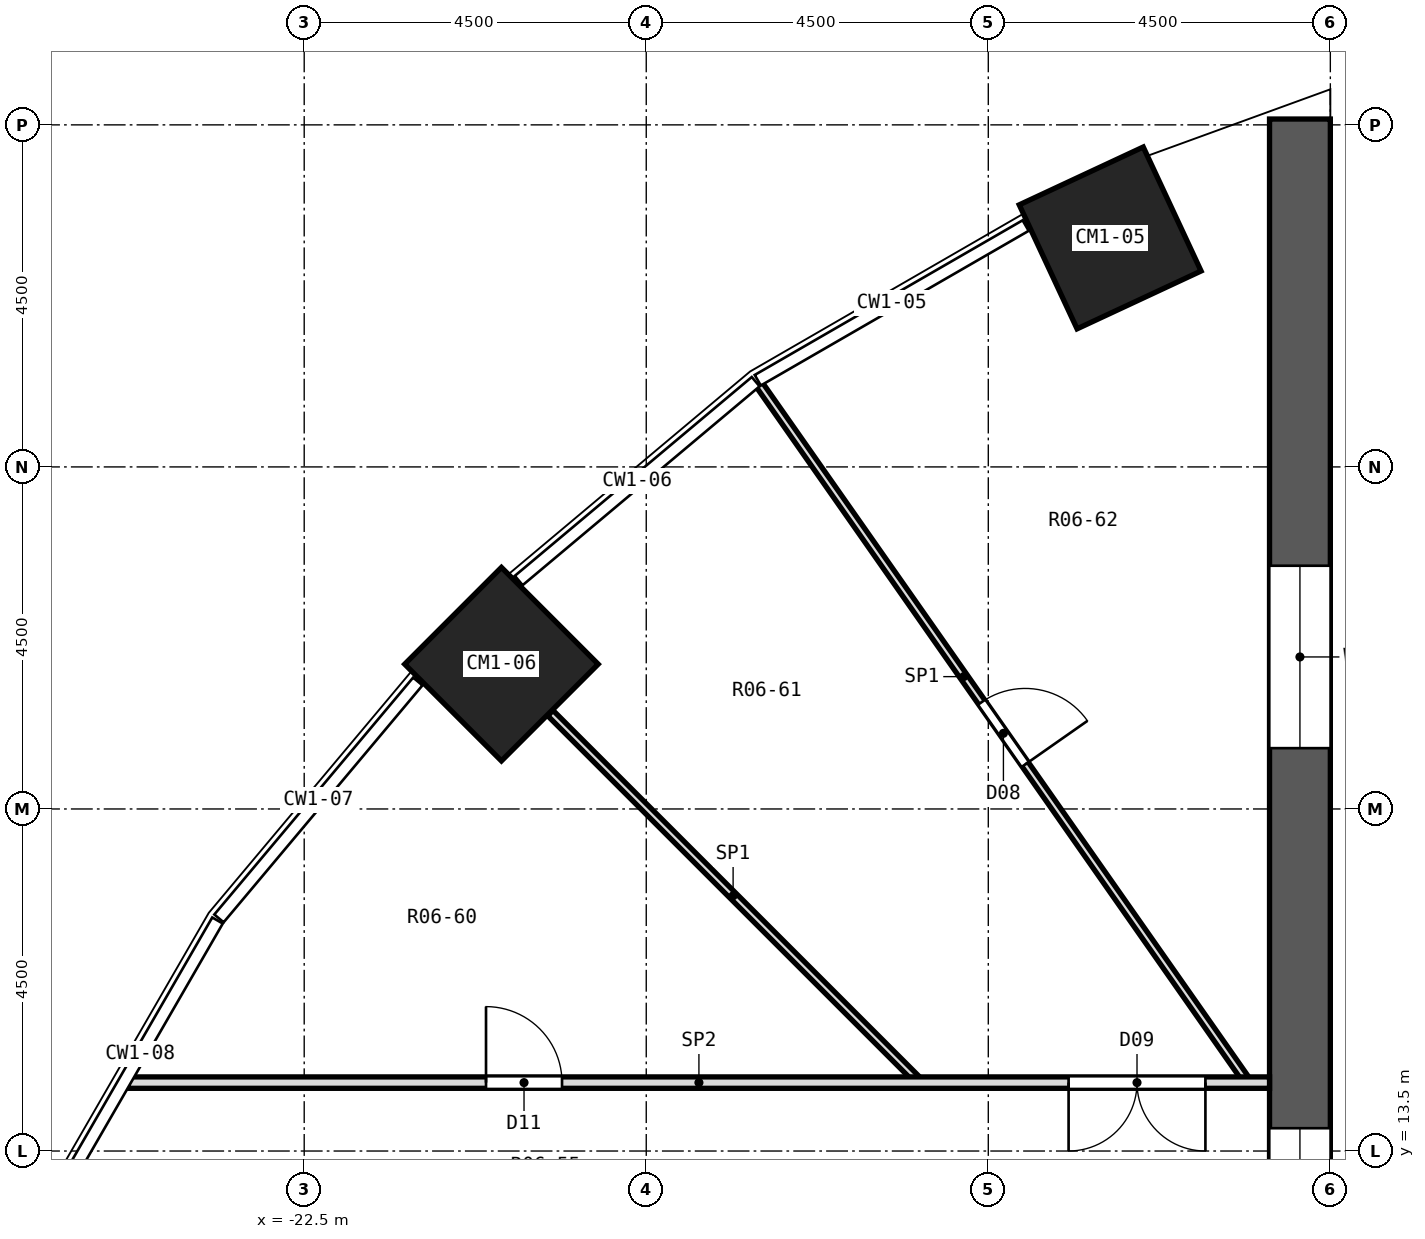
"""IFC4 building model, lengths in metres.
Left out: names, types, materials, properties, quantities, classifications, styles, units other than length and angle.
Written with IfcOpenShell. Run it as: python <this file> out.ifc"""

import sys

from ifc_helpers import new_model, si_unit, direction, frame, frame_2d, origin, origin_2d, place, context, subcontext, project, spatial, polyline, rectangle, outline, extrude, element, fill, save


model = new_model("IFC4")
c1 = context("Model", 3, precision=1e-05, world=origin(), true_north=direction((0.0, 1.0)))
c2 = subcontext(c1, "Body", "Model", "MODEL_VIEW")
j1 = project(units=[si_unit("LENGTHUNIT", "METRE"), si_unit("PLANEANGLEUNIT", "RADIAN")], contexts=[c1])
p1 = place(None, origin())
s1 = spatial("IfcSite", under=j1, at=p1, CompositionType="ELEMENT")
p2 = place(p1, origin())
s2 = spatial("IfcBuilding", under=s1, at=p2, CompositionType="ELEMENT")
p3 = place(p2, frame((0.0, 0.0, 13.4)))
s3 = spatial("IfcBuildingStorey", under=s2, at=p3, CompositionType="ELEMENT", Elevation=13.4)
for number, where, z_axis, x_axis in (
    (1, (-11.897, 25.512, 0.0), (0.0, 0.0, 1.0), (-0.423, 0.906, 0.0)),
    (2, (-19.905, 19.905, 0.0), (0.0, 0.0, 1.0), (-0.707, 0.707, 0.0)),
):
    element("IfcColumn", number, at=place(p3, frame(where, z_axis=z_axis, x_axis=x_axis)), inside=s3, PredefinedType="COLUMN", context=c2, shape_type="SweptSolid", body=[
        extrude(rectangle(XDim=1.8, YDim=1.8, at=origin_2d()), origin(), (0.0, 0.0, 1.0), 4.2),
    ])
p4 = place(p3, frame((-9.4, -27.077, 0.0), z_axis=(0.0, 0.0, 1.0), x_axis=(0.0, 1.0, 0.0)))
e3 = element("IfcWall", 3, at=p4, inside=s3, PredefinedType="SHEAR", context=c2, shape_type="SweptSolid", body=[
    extrude(rectangle(XDim=54.154, YDim=0.8, at=frame_2d((27.077, 0.0))), origin(), (0.0, 0.0, 1.0), 4.2),
])
p5 = place(p4, frame((13.277, 0.0, 0.9)))
e4 = element("IfcOpeningElement", 4, at=p5, cuts=e3, PredefinedType="OPENING", context=c2, shape_type="SweptSolid", body=[
    extrude(rectangle(XDim=2.4, YDim=2.1, at=frame_2d((1.2, 1.05))), frame((0.0, 0.412, 0.0), z_axis=(0.0, -1.0, 0.0), x_axis=(1.0, 0.0, 0.0)), (0.0, 0.0, 1.0), 0.824),
])
p6 = place(p4, frame((17.877, 0.0, 0.9)))
e5 = element("IfcOpeningElement", 5, at=p6, cuts=e3, PredefinedType="OPENING", context=c2, shape_type="SweptSolid", body=[
    extrude(rectangle(XDim=2.4, YDim=2.1, at=frame_2d((1.2, 1.05))), frame((0.0, 0.412, 0.0), z_axis=(0.0, -1.0, 0.0), x_axis=(1.0, 0.0, 0.0)), (0.0, 0.0, 1.0), 0.824),
])
p7 = place(p4, frame((22.477, 0.0, 0.9)))
e6 = element("IfcOpeningElement", 6, at=p7, cuts=e3, PredefinedType="OPENING", context=c2, shape_type="SweptSolid", body=[
    extrude(rectangle(XDim=2.4, YDim=2.1, at=frame_2d((1.2, 1.05))), frame((0.0, 0.412, 0.0), z_axis=(0.0, -1.0, 0.0), x_axis=(1.0, 0.0, 0.0)), (0.0, 0.0, 1.0), 0.824),
])
p8 = place(p4, frame((29.277, 0.0, 0.9)))
e7 = element("IfcOpeningElement", 7, at=p8, cuts=e3, PredefinedType="OPENING", context=c2, shape_type="SweptSolid", body=[
    extrude(rectangle(XDim=2.4, YDim=2.1, at=frame_2d((1.2, 1.05))), frame((0.0, 0.412, 0.0), z_axis=(0.0, -1.0, 0.0), x_axis=(1.0, 0.0, 0.0)), (0.0, 0.0, 1.0), 0.824),
])
p9 = place(p4, frame((33.877, 0.0, 0.9)))
e8 = element("IfcOpeningElement", 8, at=p9, cuts=e3, PredefinedType="OPENING", context=c2, shape_type="SweptSolid", body=[
    extrude(rectangle(XDim=2.4, YDim=2.1, at=frame_2d((1.2, 1.05))), frame((0.0, 0.412, 0.0), z_axis=(0.0, -1.0, 0.0), x_axis=(1.0, 0.0, 0.0)), (0.0, 0.0, 1.0), 0.824),
])
p10 = place(p4, frame((38.477, 0.0, 0.9)))
e9 = element("IfcOpeningElement", 9, at=p10, cuts=e3, PredefinedType="OPENING", context=c2, shape_type="SweptSolid", body=[
    extrude(rectangle(XDim=2.4, YDim=2.1, at=frame_2d((1.2, 1.05))), frame((0.0, 0.412, 0.0), z_axis=(0.0, -1.0, 0.0), x_axis=(1.0, 0.0, 0.0)), (0.0, 0.0, 1.0), 0.824),
])
p11 = place(p4, frame((5.877, 0.0, 0.9)))
e10 = element("IfcOpeningElement", 10, at=p11, cuts=e3, PredefinedType="OPENING", context=c2, shape_type="SweptSolid", body=[
    extrude(rectangle(XDim=2.4, YDim=2.1, at=frame_2d((1.2, 1.05))), frame((0.0, 0.412, 0.0), z_axis=(0.0, -1.0, 0.0), x_axis=(1.0, 0.0, 0.0)), (0.0, 0.0, 1.0), 0.824),
])
p12 = place(p4, frame((45.877, 0.0, 0.9)))
e11 = element("IfcOpeningElement", 11, at=p12, cuts=e3, PredefinedType="OPENING", context=c2, shape_type="SweptSolid", body=[
    extrude(rectangle(XDim=2.4, YDim=2.1, at=frame_2d((1.2, 1.05))), frame((0.0, 0.412, 0.0), z_axis=(0.0, -1.0, 0.0), x_axis=(1.0, 0.0, 0.0)), (0.0, 0.0, 1.0), 0.824),
])
p13 = place(p3, frame((-11.631, 26.482, 0.0), z_axis=(-0.342026905008, 0.939688050207, 0.001991117406), x_axis=(0.93968991291, 0.342027583063, -3.2668e-08)))
e12 = element("IfcWall", 12, at=p13, inside=s3, PredefinedType="SOLIDWALL", context=c2, shape_type="SweptSolid", body=[
    extrude(outline(polyline([(0.0, 0.0), (2.81, 2.168e-19), (3.467, -8.514e-08), (3.745, -0.523), (3.745, -3.65), (3.745, -4.2), (2.81, -4.2), (2.81, -3.65), (-4.403e-05, -3.65), (0.0, 0.0)])), origin(), (0.0, 0.0, -1.0), 0.38),
])
p14 = place(p3, frame((-16.519, 23.591, 0.0), z_axis=(0.0, 0.0, 1.0), x_axis=(0.573601998214, -0.819134145086, 0.0)))
e13 = element("IfcWall", 13, at=p14, inside=s3, PredefinedType="PARTITIONING", context=c2, shape_type="SweptSolid", body=[
    extrude(rectangle(XDim=11.146, YDim=0.1, at=frame_2d((5.573, 0.0))), origin(), (0.0, 0.0, 1.0), 3.65),
])
p15 = place(p14, frame((5.11, 0.0, 0.0)))
e14 = element("IfcOpeningElement", 14, at=p15, cuts=e13, PredefinedType="OPENING", context=c2, shape_type="SweptSolid", body=[
    extrude(rectangle(XDim=1.0, YDim=2.1, at=frame_2d((0.5, 1.05))), frame((0.0, 0.062, 0.0), z_axis=(0.0, -1.0, 0.0), x_axis=(1.0, 0.0, 0.0)), (0.0, 0.0, 1.0), 0.124),
])
p16 = place(p3, frame((-19.262, 19.262, 0.0), z_axis=(0.0, 0.0, 1.0), x_axis=(0.707196525799, -0.707017025183, 0.0)))
e15 = element("IfcWall", 15, at=p16, inside=s3, PredefinedType="PARTITIONING", context=c2, shape_type="SweptSolid", body=[
    extrude(rectangle(XDim=6.801, YDim=0.1, at=frame_2d((3.4, 0.0))), origin(), (0.0, 0.0, 1.0), 3.65),
])
p17 = place(p3, frame((-24.814, 14.4, 0.0), z_axis=(0.0, 0.0, 1.0), x_axis=(1.0, 0.0, 0.0)))
e16 = element("IfcWall", 16, at=p17, inside=s3, PredefinedType="PARTITIONING", context=c2, shape_type="SweptSolid", body=[
    extrude(rectangle(XDim=15.014, YDim=0.15, at=frame_2d((7.507, 0.0))), origin(), (0.0, 0.0, 1.0), 3.65),
])
p18 = place(p17, frame((12.371, 0.0, 0.0)))
e17 = element("IfcOpeningElement", 17, at=p18, cuts=e16, PredefinedType="OPENING", context=c2, shape_type="SweptSolid", body=[
    extrude(rectangle(XDim=1.8, YDim=2.1, at=frame_2d((0.9, 1.05))), frame((0.0, 0.087, 0.0), z_axis=(0.0, -1.0, 0.0), x_axis=(1.0, 0.0, 0.0)), (0.0, 0.0, 1.0), 0.174),
])
p19 = place(p17, frame((4.706, 0.0, 0.0)))
e18 = element("IfcOpeningElement", 18, at=p19, cuts=e16, PredefinedType="OPENING", context=c2, shape_type="SweptSolid", body=[
    extrude(rectangle(XDim=1.0, YDim=2.1, at=frame_2d((0.5, 1.05))), frame((0.0, 0.087, 0.0), z_axis=(0.0, -1.0, 0.0), x_axis=(1.0, 0.0, 0.0)), (0.0, 0.0, 1.0), 0.174),
])
p20 = place(p15, origin())
e19 = element("IfcDoor", 19, at=p20, inside=s3, OperationType="SINGLE_SWING_RIGHT", PredefinedType="DOOR", context=c2, shape_type="SweptSolid", body=[
    extrude(rectangle(XDim=1.0, YDim=2.1, at=frame_2d((0.5, 1.05))), frame((0.0, 0.025, 0.0), z_axis=(0.0, -1.0, 0.0), x_axis=(1.0, 0.0, 0.0)), (0.0, 0.0, 1.0), 0.05),
])
fill(e14, e19)
p21 = place(p18, frame((1.8, 0.0, 0.0), z_axis=(0.0, 0.0, 1.0), x_axis=(-1.0, 0.0, 0.0)))
e20 = element("IfcDoor", 20, at=p21, inside=s3, OperationType="DOUBLE_DOOR_SINGLE_SWING", PredefinedType="DOOR", context=c2, shape_type="SweptSolid", body=[
    extrude(rectangle(XDim=1.8, YDim=2.1, at=frame_2d((0.9, 1.05))), frame((0.0, 0.025, 0.0), z_axis=(0.0, -1.0, 0.0), x_axis=(1.0, 0.0, 0.0)), (0.0, 0.0, 1.0), 0.05),
])
fill(e17, e20)
p22 = place(p19, origin())
e21 = element("IfcDoor", 21, at=p22, inside=s3, OperationType="SINGLE_SWING_LEFT", PredefinedType="DOOR", context=c2, shape_type="SweptSolid", body=[
    extrude(rectangle(XDim=1.0, YDim=2.1, at=frame_2d((0.5, 1.05))), frame((0.0, 0.025, 0.0), z_axis=(0.0, -1.0, 0.0), x_axis=(1.0, 0.0, 0.0)), (0.0, 0.0, 1.0), 0.05),
])
fill(e18, e21)
p23 = place(p10, origin())
e22 = element("IfcWindow", 22, at=p23, inside=s3, PartitioningType="SINGLE_PANEL", PredefinedType="WINDOW", context=c2, shape_type="SweptSolid", body=[
    extrude(rectangle(XDim=2.4, YDim=2.1, at=frame_2d((1.2, 1.05))), frame((0.0, 0.03, 0.0), z_axis=(0.0, -1.0, 0.0), x_axis=(1.0, 0.0, 0.0)), (0.0, 0.0, 1.0), 0.06),
])
fill(e9, e22)
p24 = place(p12, origin())
e23 = element("IfcWindow", 23, at=p24, inside=s3, PartitioningType="SINGLE_PANEL", PredefinedType="WINDOW", context=c2, shape_type="SweptSolid", body=[
    extrude(rectangle(XDim=2.4, YDim=2.1, at=frame_2d((1.2, 1.05))), frame((0.0, 0.03, 0.0), z_axis=(0.0, -1.0, 0.0), x_axis=(1.0, 0.0, 0.0)), (0.0, 0.0, 1.0), 0.06),
])
fill(e11, e23)
save(model, sys.argv[1])
